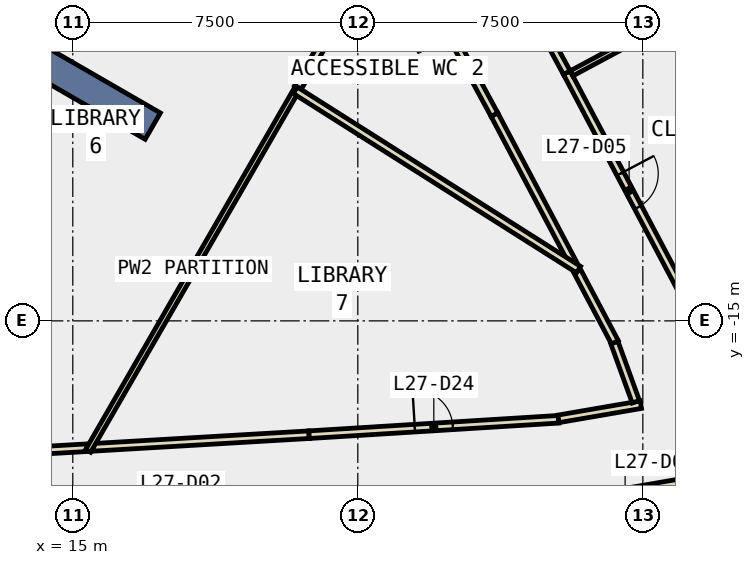
"""IFC4 building model, lengths in metres.
Left out: names, types, materials, properties, quantities, classifications, styles, units other than length and angle.
Written with IfcOpenShell. Run it as: python <this file> out.ifc"""

import sys

from ifc_helpers import new_model, si_unit, direction, frame, frame_2d, origin, place, context, subcontext, project, spatial, rectangle, extrude, element, fill, save


model = new_model("IFC4")
c1 = context("Model", 3, precision=1e-05, world=origin(), true_north=direction((0.0, 1.0)))
c2 = subcontext(c1, "Body", "Model", "MODEL_VIEW")
j1 = project(units=[si_unit("LENGTHUNIT", "METRE"), si_unit("PLANEANGLEUNIT", "RADIAN")], contexts=[c1])
p1 = place(None, origin())
s1 = spatial("IfcSite", under=j1, at=p1, CompositionType="ELEMENT")
p2 = place(p1, origin())
s2 = spatial("IfcBuilding", under=s1, at=p2, CompositionType="ELEMENT")
p3 = place(p2, frame((0.0, 0.0, 124.4)))
s3 = spatial("IfcBuildingStorey", under=s2, at=p3, CompositionType="ELEMENT", Elevation=124.4)
p4 = place(p3, frame((9.31, -5.375, -0.4), z_axis=(0.0, 0.0, 1.0), x_axis=(0.866017533419, -0.500013631625, 0.0)))
e1 = element("IfcWall", 1, at=p4, inside=s3, PredefinedType="SHEAR", context=c2, shape_type="SweptSolid", body=[
    extrude(rectangle(XDim=9.0, YDim=0.8, at=frame_2d((4.5, 0.0))), origin(), (0.0, 0.0, 1.0), 4.2),
])
p5 = place(p3, frame((14.288, -18.4, 0.0), z_axis=(0.0, 0.0, 1.0), x_axis=(0.998339941676, 0.057596535097, 0.0)))
e2 = element("IfcWall", 2, at=p5, inside=s3, PredefinedType="PARTITIONING", context=c2, shape_type="SweptSolid", body=[
    extrude(rectangle(XDim=1.094, YDim=0.2, at=frame_2d((0.547, 0.0))), origin(), (0.0, 0.0, 1.0), 3.8),
])
p6 = place(p3, frame((15.529, -18.328, 0.0), z_axis=(0.0, 0.0, 1.0), x_axis=(0.998293671523, 0.058393025246, 0.0)))
e3 = element("IfcWall", 3, at=p6, inside=s3, PredefinedType="PARTITIONING", context=c2, shape_type="SweptSolid", body=[
    extrude(rectangle(XDim=5.699, YDim=0.2, at=frame_2d((2.849, 0.0))), origin(), (0.0, 0.0, 1.0), 3.8),
])
p7 = place(p3, frame((21.218, -17.995, 0.0), z_axis=(0.0, 0.0, 1.0), x_axis=(0.998092528214, 0.061735768594, 0.0)))
e4 = element("IfcWall", 4, at=p7, inside=s3, PredefinedType="PARTITIONING", context=c2, shape_type="SweptSolid", body=[
    extrude(rectangle(XDim=6.576, YDim=0.2, at=frame_2d((3.288, 0.0))), origin(), (0.0, 0.0, 1.0), 3.8),
])
p8 = place(p7, frame((2.788, 0.0, 0.0)))
e5 = element("IfcOpeningElement", 5, at=p8, cuts=e4, PredefinedType="OPENING", context=c2, shape_type="SweptSolid", body=[
    extrude(rectangle(XDim=1.0, YDim=2.1, at=frame_2d((0.5, 1.05))), frame((0.0, 0.11, 0.0), z_axis=(0.0, -1.0, 0.0), x_axis=(1.0, 0.0, 0.0)), (0.0, 0.0, 1.0), 0.22),
])
p9 = place(p3, frame((27.78, -17.578, 0.0), z_axis=(0.0, 0.0, 1.0), x_axis=(0.985534991456, 0.169472064409, 0.0)))
e6 = element("IfcWall", 6, at=p9, inside=s3, PredefinedType="PARTITIONING", context=c2, shape_type="SweptSolid", body=[
    extrude(rectangle(XDim=2.2, YDim=0.2, at=frame_2d((1.1, 0.0))), origin(), (0.0, 0.0, 1.0), 3.8),
])
p10 = place(p3, frame((29.816, -17.128, 0.0), z_axis=(0.0, 0.0, 1.0), x_axis=(-0.340726116699, 0.940162599447, 0.0)))
e7 = element("IfcWall", 7, at=p10, inside=s3, PredefinedType="PARTITIONING", context=c2, shape_type="SweptSolid", body=[
    extrude(rectangle(XDim=1.658, YDim=0.2, at=frame_2d((0.829, 0.0))), origin(), (0.0, 0.0, 1.0), 3.8),
])
p11 = place(p3, frame((29.264, -15.564, 0.0), z_axis=(0.0, 0.0, 1.0), x_axis=(-0.46760771465, 0.883936097917, 0.0)))
e8 = element("IfcWall", 8, at=p11, inside=s3, PredefinedType="PARTITIONING", context=c2, shape_type="SweptSolid", body=[
    extrude(rectangle(XDim=2.123, YDim=0.2, at=frame_2d((1.062, 0.0))), origin(), (0.0, 0.0, 1.0), 3.8),
])
p12 = place(p3, frame((28.177, -13.51, 0.0), z_axis=(0.0, 0.0, 1.0), x_axis=(-0.467580354248, 0.883950571198, 0.0)))
e9 = element("IfcWall", 9, at=p12, inside=s3, PredefinedType="PARTITIONING", context=c2, shape_type="SweptSolid", body=[
    extrude(rectangle(XDim=4.453, YDim=0.2, at=frame_2d((2.227, 0.0))), origin(), (0.0, 0.0, 1.0), 3.8),
])
p13 = place(p3, frame((26.095, -9.574, 0.0), z_axis=(0.0, 0.0, 1.0), x_axis=(-0.476963271937, 0.878923226012, 0.0)))
e10 = element("IfcWall", 10, at=p13, inside=s3, PredefinedType="PARTITIONING", context=c2, shape_type="SweptSolid", body=[
    extrude(rectangle(XDim=5.573, YDim=0.2, at=frame_2d((2.786, 0.0))), origin(), (0.0, 0.0, 1.0), 3.8),
])
p14 = place(p13, frame((2.386, 0.0, 0.0)))
e11 = element("IfcOpeningElement", 11, at=p14, cuts=e10, PredefinedType="OPENING", context=c2, shape_type="SweptSolid", body=[
    extrude(rectangle(XDim=1.0, YDim=2.1, at=frame_2d((0.5, 1.05))), frame((0.0, 0.11, 0.0), z_axis=(0.0, -1.0, 0.0), x_axis=(1.0, 0.0, 0.0)), (0.0, 0.0, 1.0), 0.22),
])
p15 = place(p3, frame((31.033, -19.251, 0.0), z_axis=(0.0, 0.0, 1.0), x_axis=(-0.985494394638, -0.169707979005, 0.0)))
e12 = element("IfcWall", 12, at=p15, inside=s3, PredefinedType="PARTITIONING", context=c2, shape_type="SweptSolid", body=[
    extrude(rectangle(XDim=3.041, YDim=0.2, at=frame_2d((1.521, 0.0))), origin(), (0.0, 0.0, 1.0), 3.8),
])
p16 = place(p15, frame((1.021, 0.0, 0.0)))
e13 = element("IfcOpeningElement", 13, at=p16, cuts=e12, PredefinedType="OPENING", context=c2, shape_type="SweptSolid", body=[
    extrude(rectangle(XDim=1.0, YDim=2.1, at=frame_2d((0.5, 1.05))), frame((0.0, 0.11, 0.0), z_axis=(0.0, -1.0, 0.0), x_axis=(1.0, 0.0, 0.0)), (0.0, 0.0, 1.0), 0.22),
])
p17 = place(p3, frame((27.999, -8.469, 0.0), z_axis=(0.0, 0.0, 1.0), x_axis=(0.467683043694, -0.883896244274, 0.0)))
e14 = element("IfcWall", 14, at=p17, inside=s3, PredefinedType="PARTITIONING", context=c2, shape_type="SweptSolid", body=[
    extrude(rectangle(XDim=7.015, YDim=0.2, at=frame_2d((3.508, 0.0))), origin(), (0.0, 0.0, 1.0), 3.8),
])
p18 = place(p17, frame((3.008, 0.0, 0.0)))
e15 = element("IfcOpeningElement", 15, at=p18, cuts=e14, PredefinedType="OPENING", context=c2, shape_type="SweptSolid", body=[
    extrude(rectangle(XDim=1.0, YDim=2.1, at=frame_2d((0.5, 1.05))), frame((0.0, 0.11, 0.0), z_axis=(0.0, -1.0, 0.0), x_axis=(1.0, 0.0, 0.0)), (0.0, 0.0, 1.0), 0.22),
])
p19 = place(p3, frame((24.595, -2.196, 0.0), z_axis=(0.0, 0.0, 1.0), x_axis=(0.47695522124, -0.878927594818, 0.0)))
e16 = element("IfcWall", 16, at=p19, inside=s3, PredefinedType="PARTITIONING", context=c2, shape_type="SweptSolid", body=[
    extrude(rectangle(XDim=7.137, YDim=0.2, at=frame_2d((3.568, 0.0))), origin(), (0.0, 0.0, 1.0), 3.8),
])
p20 = place(p19, frame((3.144, 0.0, 0.0)))
e17 = element("IfcOpeningElement", 17, at=p20, cuts=e16, PredefinedType="OPENING", context=c2, shape_type="SweptSolid", body=[
    extrude(rectangle(XDim=1.0, YDim=2.1, at=frame_2d((0.5, 1.05))), frame((0.0, 0.11, 0.0), z_axis=(0.0, -1.0, 0.0), x_axis=(1.0, 0.0, 0.0)), (0.0, 0.0, 1.0), 0.22),
])
p21 = place(p3, frame((20.924, -8.858, 0.0), z_axis=(0.0, 0.0, 1.0), x_axis=(-0.499996828157, -0.866027235041, 0.0)))
e18 = element("IfcWall", 18, at=p21, inside=s3, PredefinedType="PARTITIONING", context=c2, shape_type="SweptSolid", body=[
    extrude(rectangle(XDim=11.04, YDim=0.15, at=frame_2d((5.52, 0.0))), origin(), (0.0, 0.0, 1.0), 3.8),
])
p22 = place(p3, frame((23.191, -4.932, 0.0), z_axis=(0.0, 0.0, 1.0), x_axis=(-0.500025458316, -0.86601070492, 0.0)))
e19 = element("IfcWall", 19, at=p22, inside=s3, PredefinedType="PARTITIONING", context=c2, shape_type="SweptSolid", body=[
    extrude(rectangle(XDim=4.533, YDim=0.2, at=frame_2d((2.267, 0.0))), origin(), (0.0, 0.0, 1.0), 3.8),
])
p23 = place(p3, frame((20.853, -8.931, 0.0), z_axis=(0.0, 0.0, 1.0), x_axis=(0.844869091455, -0.534973100542, 0.0)))
e20 = element("IfcWall", 20, at=p23, inside=s3, PredefinedType="PARTITIONING", context=c2, shape_type="SweptSolid", body=[
    extrude(rectangle(XDim=8.825, YDim=0.2, at=frame_2d((4.413, 0.0))), origin(), (0.0, 0.0, 1.0), 3.8),
])
p24 = place(p3, frame((28.123, -8.488, 0.0), z_axis=(0.0, 0.0, 1.0), x_axis=(0.881406449288, 0.472358625573, 0.0)))
e21 = element("IfcWall", 21, at=p24, inside=s3, PredefinedType="PARTITIONING", context=c2, shape_type="SweptSolid", body=[
    extrude(rectangle(XDim=5.53, YDim=0.15, at=frame_2d((2.765, 0.0))), origin(), (0.0, 0.0, 1.0), 3.8),
])
p25 = place(p18, origin())
e22 = element("IfcDoor", 22, at=p25, inside=s3, OperationType="SINGLE_SWING_LEFT", PredefinedType="DOOR", context=c2, shape_type="SweptSolid", body=[
    extrude(rectangle(XDim=1.0, YDim=2.1, at=frame_2d((0.5, 1.05))), frame((0.0, 0.025, 0.0), z_axis=(0.0, -1.0, 0.0), x_axis=(1.0, 0.0, 0.0)), (0.0, 0.0, 1.0), 0.05),
])
fill(e15, e22)
p26 = place(p8, origin())
e23 = element("IfcDoor", 23, at=p26, inside=s3, OperationType="SINGLE_SWING_LEFT", PredefinedType="DOOR", context=c2, shape_type="SweptSolid", body=[
    extrude(rectangle(XDim=1.0, YDim=2.1, at=frame_2d((0.5, 1.05))), frame((0.0, 0.025, 0.0), z_axis=(0.0, -1.0, 0.0), x_axis=(1.0, 0.0, 0.0)), (0.0, 0.0, 1.0), 0.05),
])
fill(e5, e23)
save(model, sys.argv[1])
